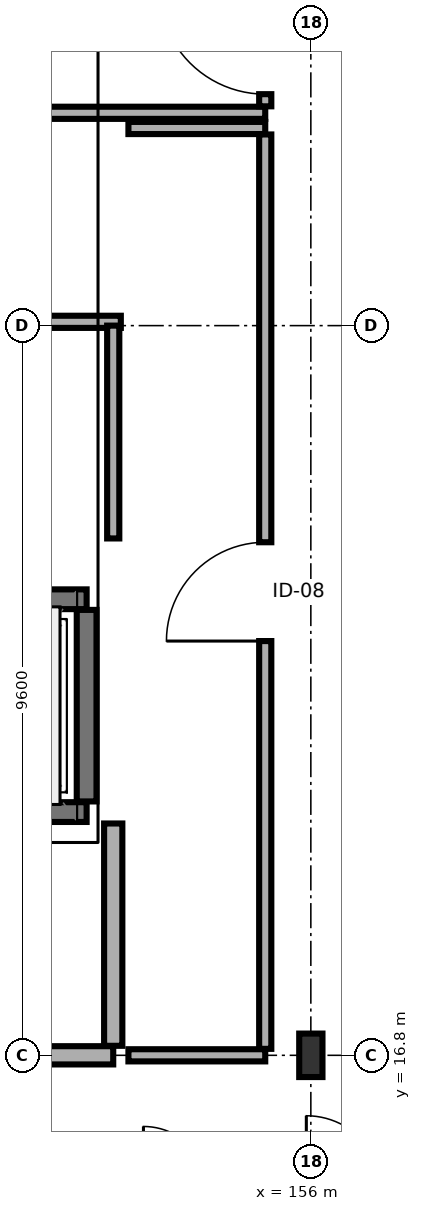
"""IFC4 building model, lengths in metres.
Left out: names, types, materials, properties, quantities, classifications, styles, units other than length and angle.
Written with IfcOpenShell. Run it as: python <this file> out.ifc"""

import sys

from ifc_helpers import new_model, si_unit, direction, frame, frame_2d, origin, origin_2d, place, context, subcontext, project, spatial, rectangle, i_section, extrude, element, fill, save


model = new_model("IFC4")
c1 = context("Model", 3, precision=1e-05, world=origin(), true_north=direction((0.0, 1.0)))
c2 = subcontext(c1, "Body", "Model", "MODEL_VIEW")
j1 = project(units=[si_unit("LENGTHUNIT", "METRE"), si_unit("PLANEANGLEUNIT", "RADIAN")], contexts=[c1])
p1 = place(None, origin())
s1 = spatial("IfcSite", under=j1, at=p1, CompositionType="ELEMENT")
p2 = place(p1, origin())
s2 = spatial("IfcBuilding", under=s1, at=p2, CompositionType="ELEMENT")
p3 = place(p2, frame((0.0, 0.0, 21.5)))
s3 = spatial("IfcBuildingStorey", under=s2, at=p3, CompositionType="ELEMENT", Elevation=21.5)
p4 = place(p3, frame((156.0, 16.8, 0.0), z_axis=(0.0, 0.0, 1.0), x_axis=(1.0, 0.0, 0.0)))
e1 = element("IfcColumn", 1, at=p4, inside=s3, PredefinedType="COLUMN", context=c2, shape_type="SweptSolid", body=[
    extrude(i_section(OverallWidth=0.306, OverallDepth=0.572, WebThickness=0.021, FlangeThickness=0.04, FilletRadius=0.027, at=origin_2d()), origin(), (0.0, 0.0, 1.0), 3.4),
])
p5 = place(p3, frame((150.55, 20.0, 0.0), z_axis=(0.0, 0.0, 1.0), x_axis=(1.0, 0.0, 0.0)))
e2 = element("IfcWall", 2, at=p5, inside=s3, PredefinedType="SHEAR", context=c2, shape_type="SweptSolid", body=[
    extrude(rectangle(XDim=2.5, YDim=0.26, at=frame_2d((1.25, 0.0))), origin(), (0.0, 0.0, 1.0), 3.195),
])
p6 = place(p5, frame((0.55, 0.0, 0.0)))
e3 = element("IfcOpeningElement", 3, at=p6, cuts=e2, PredefinedType="OPENING", context=c2, shape_type="SweptSolid", body=[
    extrude(rectangle(XDim=1.4, YDim=2.3, at=frame_2d((0.7, 1.15))), frame((0.0, 0.14, 0.0), z_axis=(0.0, -1.0, 0.0), x_axis=(1.0, 0.0, 0.0)), (0.0, 0.0, 1.0), 0.28),
])
p7 = place(p3, frame((150.55, 22.8, 0.0), z_axis=(0.0, 0.0, 1.0), x_axis=(1.0, 0.0, 0.0)))
e4 = element("IfcWall", 4, at=p7, inside=s3, PredefinedType="SHEAR", context=c2, shape_type="SweptSolid", body=[
    extrude(rectangle(XDim=2.5, YDim=0.26, at=frame_2d((1.25, 0.0))), origin(), (0.0, 0.0, 1.0), 3.195),
])
p8 = place(p3, frame((153.05, 20.14, 0.0), z_axis=(0.0, 0.0, 1.0), x_axis=(0.0, 1.0, 0.0)))
e5 = element("IfcWall", 5, at=p8, inside=s3, PredefinedType="SHEAR", context=c2, shape_type="SweptSolid", body=[
    extrude(rectangle(XDim=2.52, YDim=0.26, at=frame_2d((1.26, 0.0))), origin(), (0.0, 0.0, 1.0), 3.195),
])
p9 = place(p3, frame((146.4, 16.8, 0.0), z_axis=(0.0, 0.0, 1.0), x_axis=(1.0, 0.0, 0.0)))
e6 = element("IfcWall", 6, at=p9, inside=s3, PredefinedType="SOLIDWALL", context=c2, shape_type="SweptSolid", body=[
    extrude(rectangle(XDim=7.0, YDim=0.24, at=frame_2d((3.5, 0.0))), origin(), (0.0, 0.0, 1.0), 2.73),
])
p10 = place(p9, frame((2.7, 0.0, 0.0)))
e7 = element("IfcOpeningElement", 7, at=p10, cuts=e6, PredefinedType="OPENING", context=c2, shape_type="SweptSolid", body=[
    extrude(rectangle(XDim=1.6, YDim=2.2, at=frame_2d((0.8, 1.1))), frame((0.0, 0.13, 0.0), z_axis=(0.0, -1.0, 0.0), x_axis=(1.0, 0.0, 0.0)), (0.0, 0.0, 1.0), 0.26),
])
p11 = place(p3, frame((153.4, 16.925, 0.0), z_axis=(0.0, 0.0, 1.0), x_axis=(0.0, 1.0, 0.0)))
e8 = element("IfcWall", 8, at=p11, inside=s3, PredefinedType="SOLIDWALL", context=c2, shape_type="SweptSolid", body=[
    extrude(rectangle(XDim=2.925, YDim=0.24, at=frame_2d((1.462, 0.0))), origin(), (0.0, 0.0, 1.0), 2.73),
])
p12 = place(p3, frame((146.4, 29.2, 0.0), z_axis=(0.0, 0.0, 1.0), x_axis=(1.0, 0.0, 0.0)))
e9 = element("IfcWall", 9, at=p12, inside=s3, PredefinedType="PARTITIONING", context=c2, shape_type="SweptSolid", body=[
    extrude(rectangle(XDim=9.0, YDim=0.16, at=frame_2d((4.5, 0.0))), origin(), (0.0, 0.0, 1.0), 3.195),
])
p13 = place(p3, frame((155.4, 29.285, 0.0), z_axis=(0.0, 0.0, 1.0), x_axis=(0.0, 1.0, 0.0)))
e10 = element("IfcWall", 10, at=p13, inside=s3, PredefinedType="PARTITIONING", context=c2, shape_type="SweptSolid", body=[
    extrude(rectangle(XDim=9.03, YDim=0.16, at=frame_2d((4.515, 0.0))), origin(), (0.0, 0.0, 1.0), 3.195),
])
p14 = place(p13, frame((0.16, 0.0, 0.0)))
e11 = element("IfcOpeningElement", 11, at=p14, cuts=e10, PredefinedType="OPENING", context=c2, shape_type="SweptSolid", body=[
    extrude(rectangle(XDim=1.4, YDim=2.2, at=frame_2d((0.7, 1.1))), frame((0.0, 0.09, 0.0), z_axis=(0.0, -1.0, 0.0), x_axis=(1.0, 0.0, 0.0)), (0.0, 0.0, 1.0), 0.18),
])
p15 = place(p3, frame((153.6, 16.8, 0.0), z_axis=(0.0, 0.0, 1.0), x_axis=(1.0, 0.0, 0.0)))
e12 = element("IfcWall", 12, at=p15, inside=s3, PredefinedType="PARTITIONING", context=c2, shape_type="SweptSolid", body=[
    extrude(rectangle(XDim=1.8, YDim=0.16, at=frame_2d((0.9, 0.0))), origin(), (0.0, 0.0, 1.0), 2.73),
])
p16 = place(p3, frame((153.6, 29.0, 0.0), z_axis=(0.0, 0.0, 1.0), x_axis=(1.0, 0.0, 0.0)))
e13 = element("IfcWall", 13, at=p16, inside=s3, PredefinedType="PARTITIONING", context=c2, shape_type="SweptSolid", body=[
    extrude(rectangle(XDim=1.8, YDim=0.16, at=frame_2d((0.9, 0.0))), origin(), (0.0, 0.0, 1.0), 3.195),
])
p17 = place(p3, frame((155.4, 16.885, 0.0), z_axis=(0.0, 0.0, 1.0), x_axis=(0.0, 1.0, 0.0)))
e14 = element("IfcWall", 14, at=p17, inside=s3, PredefinedType="PARTITIONING", context=c2, shape_type="SweptSolid", body=[
    extrude(rectangle(XDim=12.03, YDim=0.16, at=frame_2d((6.015, 0.0))), origin(), (0.0, 0.0, 1.0), 2.73),
])
p18 = place(p17, frame((5.365, 0.0, 0.0)))
e15 = element("IfcOpeningElement", 15, at=p18, cuts=e14, PredefinedType="OPENING", context=c2, shape_type="SweptSolid", body=[
    extrude(rectangle(XDim=1.3, YDim=2.2, at=frame_2d((0.65, 1.1))), frame((0.0, 0.09, 0.0), z_axis=(0.0, -1.0, 0.0), x_axis=(1.0, 0.0, 0.0)), (0.0, 0.0, 1.0), 0.18),
])
p19 = place(p3, frame((152.35, 26.45, 0.0), z_axis=(0.0, 0.0, 1.0), x_axis=(1.0, 0.0, 0.0)))
e16 = element("IfcWall", 16, at=p19, inside=s3, PredefinedType="PARTITIONING", context=c2, shape_type="SweptSolid", body=[
    extrude(rectangle(XDim=1.15, YDim=0.16, at=frame_2d((0.575, 0.0))), origin(), (0.0, 0.0, 1.0), 3.195),
])
p20 = place(p3, frame((153.4, 23.6, 0.0), z_axis=(0.0, 0.0, 1.0), x_axis=(0.0, 1.0, 0.0)))
e17 = element("IfcWall", 17, at=p20, inside=s3, PredefinedType="PARTITIONING", context=c2, shape_type="SweptSolid", body=[
    extrude(rectangle(XDim=2.8, YDim=0.16, at=frame_2d((1.4, 0.0))), origin(), (0.0, 0.0, 1.0), 3.195),
])
p21 = place(p14, origin())
e18 = element("IfcDoor", 18, at=p21, inside=s3, OperationType="SINGLE_SWING_RIGHT", PredefinedType="DOOR", context=c2, shape_type="SweptSolid", body=[
    extrude(rectangle(XDim=1.4, YDim=2.2, at=frame_2d((0.7, 1.1))), frame((0.0, 0.025, 0.0), z_axis=(0.0, -1.0, 0.0), x_axis=(1.0, 0.0, 0.0)), (0.0, 0.0, 1.0), 0.05),
])
fill(e11, e18)
p22 = place(p18, origin())
e19 = element("IfcDoor", 19, at=p22, inside=s3, OperationType="SINGLE_SWING_LEFT", PredefinedType="DOOR", context=c2, shape_type="SweptSolid", body=[
    extrude(rectangle(XDim=1.3, YDim=2.2, at=frame_2d((0.65, 1.1))), frame((0.0, 0.025, 0.0), z_axis=(0.0, -1.0, 0.0), x_axis=(1.0, 0.0, 0.0)), (0.0, 0.0, 1.0), 0.05),
])
fill(e15, e19)
save(model, sys.argv[1])
